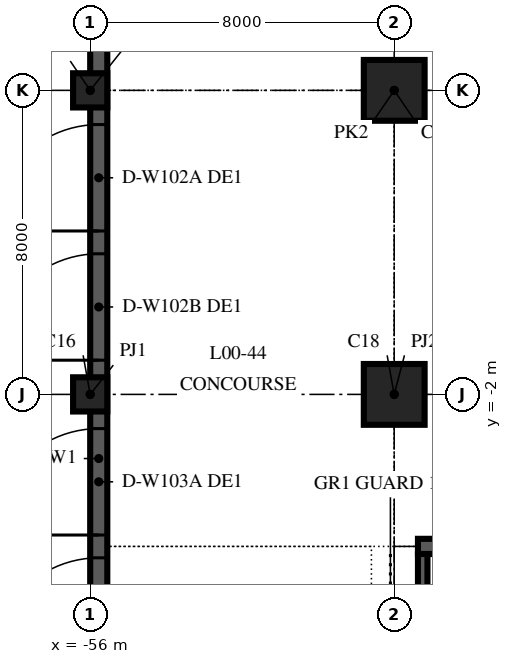
"""IFC4 building model, lengths in metres.
Left out: names, types, materials, properties, quantities, classifications, styles, units other than length and angle.
Written with IfcOpenShell. Run it as: python <this file> out.ifc"""

import sys

from ifc_helpers import new_model, si_unit, direction, frame, frame_2d, origin, origin_2d, place, context, subcontext, project, spatial, rectangle, extrude, element, fill, save


model = new_model("IFC4")
c1 = context("Model", 3, precision=1e-05, world=origin(), true_north=direction((0.0, 1.0)))
c2 = subcontext(c1, "Body", "Model", "MODEL_VIEW")
j1 = project(units=[si_unit("LENGTHUNIT", "METRE"), si_unit("PLANEANGLEUNIT", "RADIAN")], contexts=[c1])
p1 = place(None, origin())
s1 = spatial("IfcSite", under=j1, at=p1, CompositionType="ELEMENT")
p2 = place(p1, origin())
s2 = spatial("IfcBuilding", under=s1, at=p2, CompositionType="ELEMENT")
p3 = place(p2, origin())
s3 = spatial("IfcBuildingStorey", under=s2, at=p3, CompositionType="ELEMENT", Elevation=0.0)
for number, where, z_axis, x_axis in (
    (1, (-56.0, -2.0, 0.0), (0.0, 0.0, 1.0), (1.0, 0.0, 0.0)),
    (2, (-56.0, 6.0, 0.0), (0.0, 0.0, 1.0), (1.0, 0.0, 0.0)),
):
    element("IfcColumn", number, at=place(p3, frame(where, z_axis=z_axis, x_axis=x_axis)), inside=s3, PredefinedType="COLUMN", context=c2, shape_type="SweptSolid", body=[
        extrude(rectangle(XDim=0.9, YDim=0.9, at=origin_2d()), origin(), (0.0, 0.0, 1.0), 6.0),
    ])
for number, where, z_axis, x_axis in (
    (3, (-48.0, -2.0, 0.0), (0.0, 0.0, 1.0), (1.0, 0.0, 0.0)),
    (4, (-48.0, 6.0, 0.0), (0.0, 0.0, 1.0), (1.0, 0.0, 0.0)),
):
    element("IfcColumn", number, at=place(p3, frame(where, z_axis=z_axis, x_axis=x_axis)), inside=s3, PredefinedType="COLUMN", context=c2, shape_type="SweptSolid", body=[
        extrude(rectangle(XDim=1.6, YDim=1.6, at=origin_2d()), origin(), (0.0, 0.0, 1.0), 6.0),
    ])
p4 = place(p3, frame((-47.375, -6.0, 0.0), z_axis=(0.0, 0.0, 1.0), x_axis=(1.0, 0.0, 0.0)))
e5 = element("IfcWall", 5, at=p4, inside=s3, PredefinedType="SHEAR", context=c2, shape_type="SweptSolid", body=[
    extrude(rectangle(XDim=16.125, YDim=0.4, at=frame_2d((8.062, 0.0))), origin(), (0.0, 0.0, 1.0), 6.0),
])
p5 = place(p4, frame((12.775, 0.0, 0.0)))
e6 = element("IfcOpeningElement", 6, at=p5, cuts=e5, PredefinedType="OPENING", context=c2, shape_type="SweptSolid", body=[
    extrude(rectangle(XDim=1.8, YDim=2.1, at=frame_2d((0.9, 1.05))), frame((0.0, 0.215, 0.0), z_axis=(0.0, -1.0, 0.0), x_axis=(1.0, 0.0, 0.0)), (0.0, 0.0, 1.0), 0.43),
])
p6 = place(p4, frame((3.075, 0.0, 0.0)))
e7 = element("IfcOpeningElement", 7, at=p6, cuts=e5, PredefinedType="OPENING", context=c2, shape_type="SweptSolid", body=[
    extrude(rectangle(XDim=1.8, YDim=2.1, at=frame_2d((0.9, 1.05))), frame((0.0, 0.215, 0.0), z_axis=(0.0, -1.0, 0.0), x_axis=(1.0, 0.0, 0.0)), (0.0, 0.0, 1.0), 0.43),
])
p7 = place(p3, frame((-55.775, 8.0, 0.0), z_axis=(0.0, 0.0, 1.0), x_axis=(0.0, -1.0, 0.0)))
e8 = element("IfcWall", 8, at=p7, inside=s3, PredefinedType="SOLIDWALL", context=c2, shape_type="SweptSolid", body=[
    extrude(rectangle(XDim=81.55, YDim=0.45, at=frame_2d((40.775, 0.0))), origin(), (0.0, 0.0, 1.0), 6.0),
])
p8 = place(p7, frame((2.9, 0.0, 0.0)))
e9 = element("IfcOpeningElement", 9, at=p8, cuts=e8, PredefinedType="OPENING", context=c2, shape_type="SweptSolid", body=[
    extrude(rectangle(XDim=2.8, YDim=2.4, at=frame_2d((1.4, 1.2))), frame((0.0, 0.24, 0.0), z_axis=(0.0, -1.0, 0.0), x_axis=(1.0, 0.0, 0.0)), (0.0, 0.0, 1.0), 0.48),
])
p9 = place(p7, frame((6.3, 0.0, 0.0)))
e10 = element("IfcOpeningElement", 10, at=p9, cuts=e8, PredefinedType="OPENING", context=c2, shape_type="SweptSolid", body=[
    extrude(rectangle(XDim=2.8, YDim=2.4, at=frame_2d((1.4, 1.2))), frame((0.0, 0.24, 0.0), z_axis=(0.0, -1.0, 0.0), x_axis=(1.0, 0.0, 0.0)), (0.0, 0.0, 1.0), 0.48),
])
p10 = place(p7, frame((10.9, 0.0, 0.0)))
e11 = element("IfcOpeningElement", 11, at=p10, cuts=e8, PredefinedType="OPENING", context=c2, shape_type="SweptSolid", body=[
    extrude(rectangle(XDim=2.8, YDim=2.4, at=frame_2d((1.4, 1.2))), frame((0.0, 0.24, 0.0), z_axis=(0.0, -1.0, 0.0), x_axis=(1.0, 0.0, 0.0)), (0.0, 0.0, 1.0), 0.48),
])
p11 = place(p7, frame((14.3, 0.0, 0.0)))
e12 = element("IfcOpeningElement", 12, at=p11, cuts=e8, PredefinedType="OPENING", context=c2, shape_type="SweptSolid", body=[
    extrude(rectangle(XDim=2.8, YDim=2.4, at=frame_2d((1.4, 1.2))), frame((0.0, 0.24, 0.0), z_axis=(0.0, -1.0, 0.0), x_axis=(1.0, 0.0, 0.0)), (0.0, 0.0, 1.0), 0.48),
])
p12 = place(p7, frame((18.9, 0.0, 0.0)))
e13 = element("IfcOpeningElement", 13, at=p12, cuts=e8, PredefinedType="OPENING", context=c2, shape_type="SweptSolid", body=[
    extrude(rectangle(XDim=2.8, YDim=2.4, at=frame_2d((1.4, 1.2))), frame((0.0, 0.24, 0.0), z_axis=(0.0, -1.0, 0.0), x_axis=(1.0, 0.0, 0.0)), (0.0, 0.0, 1.0), 0.48),
])
p13 = place(p7, frame((22.3, 0.0, 0.0)))
e14 = element("IfcOpeningElement", 14, at=p13, cuts=e8, PredefinedType="OPENING", context=c2, shape_type="SweptSolid", body=[
    extrude(rectangle(XDim=2.8, YDim=2.4, at=frame_2d((1.4, 1.2))), frame((0.0, 0.24, 0.0), z_axis=(0.0, -1.0, 0.0), x_axis=(1.0, 0.0, 0.0)), (0.0, 0.0, 1.0), 0.48),
])
p14 = place(p7, frame((26.9, 0.0, 0.0)))
e15 = element("IfcOpeningElement", 15, at=p14, cuts=e8, PredefinedType="OPENING", context=c2, shape_type="SweptSolid", body=[
    extrude(rectangle(XDim=2.8, YDim=2.4, at=frame_2d((1.4, 1.2))), frame((0.0, 0.24, 0.0), z_axis=(0.0, -1.0, 0.0), x_axis=(1.0, 0.0, 0.0)), (0.0, 0.0, 1.0), 0.48),
])
p15 = place(p7, frame((30.3, 0.0, 0.0)))
e16 = element("IfcOpeningElement", 16, at=p15, cuts=e8, PredefinedType="OPENING", context=c2, shape_type="SweptSolid", body=[
    extrude(rectangle(XDim=2.8, YDim=2.4, at=frame_2d((1.4, 1.2))), frame((0.0, 0.24, 0.0), z_axis=(0.0, -1.0, 0.0), x_axis=(1.0, 0.0, 0.0)), (0.0, 0.0, 1.0), 0.48),
])
p16 = place(p7, frame((35.325, 0.0, 0.0)))
e17 = element("IfcOpeningElement", 17, at=p16, cuts=e8, PredefinedType="OPENING", context=c2, shape_type="SweptSolid", body=[
    extrude(rectangle(XDim=2.8, YDim=2.4, at=frame_2d((1.4, 1.2))), frame((0.0, 0.24, 0.0), z_axis=(0.0, -1.0, 0.0), x_axis=(1.0, 0.0, 0.0)), (0.0, 0.0, 1.0), 0.48),
])
p17 = place(p7, frame((42.9, 0.0, 0.0)))
e18 = element("IfcOpeningElement", 18, at=p17, cuts=e8, PredefinedType="OPENING", context=c2, shape_type="SweptSolid", body=[
    extrude(rectangle(XDim=2.8, YDim=2.4, at=frame_2d((1.4, 1.2))), frame((0.0, 0.24, 0.0), z_axis=(0.0, -1.0, 0.0), x_axis=(1.0, 0.0, 0.0)), (0.0, 0.0, 1.0), 0.48),
])
p18 = place(p7, frame((46.3, 0.0, 0.0)))
e19 = element("IfcOpeningElement", 19, at=p18, cuts=e8, PredefinedType="OPENING", context=c2, shape_type="SweptSolid", body=[
    extrude(rectangle(XDim=2.8, YDim=2.4, at=frame_2d((1.4, 1.2))), frame((0.0, 0.24, 0.0), z_axis=(0.0, -1.0, 0.0), x_axis=(1.0, 0.0, 0.0)), (0.0, 0.0, 1.0), 0.48),
])
p19 = place(p7, frame((50.9, 0.0, 0.0)))
e20 = element("IfcOpeningElement", 20, at=p19, cuts=e8, PredefinedType="OPENING", context=c2, shape_type="SweptSolid", body=[
    extrude(rectangle(XDim=2.8, YDim=2.4, at=frame_2d((1.4, 1.2))), frame((0.0, 0.24, 0.0), z_axis=(0.0, -1.0, 0.0), x_axis=(1.0, 0.0, 0.0)), (0.0, 0.0, 1.0), 0.48),
])
p20 = place(p7, frame((54.3, 0.0, 0.0)))
e21 = element("IfcOpeningElement", 21, at=p20, cuts=e8, PredefinedType="OPENING", context=c2, shape_type="SweptSolid", body=[
    extrude(rectangle(XDim=2.8, YDim=2.4, at=frame_2d((1.4, 1.2))), frame((0.0, 0.24, 0.0), z_axis=(0.0, -1.0, 0.0), x_axis=(1.0, 0.0, 0.0)), (0.0, 0.0, 1.0), 0.48),
])
p21 = place(p7, frame((58.9, 0.0, 0.0)))
e22 = element("IfcOpeningElement", 22, at=p21, cuts=e8, PredefinedType="OPENING", context=c2, shape_type="SweptSolid", body=[
    extrude(rectangle(XDim=2.8, YDim=2.4, at=frame_2d((1.4, 1.2))), frame((0.0, 0.24, 0.0), z_axis=(0.0, -1.0, 0.0), x_axis=(1.0, 0.0, 0.0)), (0.0, 0.0, 1.0), 0.48),
])
p22 = place(p7, frame((62.3, 0.0, 0.0)))
e23 = element("IfcOpeningElement", 23, at=p22, cuts=e8, PredefinedType="OPENING", context=c2, shape_type="SweptSolid", body=[
    extrude(rectangle(XDim=2.8, YDim=2.4, at=frame_2d((1.4, 1.2))), frame((0.0, 0.24, 0.0), z_axis=(0.0, -1.0, 0.0), x_axis=(1.0, 0.0, 0.0)), (0.0, 0.0, 1.0), 0.48),
])
p23 = place(p7, frame((66.9, 0.0, 0.0)))
e24 = element("IfcOpeningElement", 24, at=p23, cuts=e8, PredefinedType="OPENING", context=c2, shape_type="SweptSolid", body=[
    extrude(rectangle(XDim=2.8, YDim=2.4, at=frame_2d((1.4, 1.2))), frame((0.0, 0.24, 0.0), z_axis=(0.0, -1.0, 0.0), x_axis=(1.0, 0.0, 0.0)), (0.0, 0.0, 1.0), 0.48),
])
p24 = place(p7, frame((70.3, 0.0, 0.0)))
e25 = element("IfcOpeningElement", 25, at=p24, cuts=e8, PredefinedType="OPENING", context=c2, shape_type="SweptSolid", body=[
    extrude(rectangle(XDim=2.8, YDim=2.4, at=frame_2d((1.4, 1.2))), frame((0.0, 0.24, 0.0), z_axis=(0.0, -1.0, 0.0), x_axis=(1.0, 0.0, 0.0)), (0.0, 0.0, 1.0), 0.48),
])
p25 = place(p7, frame((74.675, 0.0, 0.0)))
e26 = element("IfcOpeningElement", 26, at=p25, cuts=e8, PredefinedType="OPENING", context=c2, shape_type="SweptSolid", body=[
    extrude(rectangle(XDim=2.8, YDim=2.4, at=frame_2d((1.4, 1.2))), frame((0.0, 0.24, 0.0), z_axis=(0.0, -1.0, 0.0), x_axis=(1.0, 0.0, 0.0)), (0.0, 0.0, 1.0), 0.48),
])
p26 = place(p7, frame((78.075, 0.0, 0.0)))
e27 = element("IfcOpeningElement", 27, at=p26, cuts=e8, PredefinedType="OPENING", context=c2, shape_type="SweptSolid", body=[
    extrude(rectangle(XDim=2.8, YDim=2.4, at=frame_2d((1.4, 1.2))), frame((0.0, 0.24, 0.0), z_axis=(0.0, -1.0, 0.0), x_axis=(1.0, 0.0, 0.0)), (0.0, 0.0, 1.0), 0.48),
])
p27 = place(p3, frame((-47.25, -16.075, 0.0), z_axis=(0.0, 0.0, 1.0), x_axis=(0.0, 1.0, 0.0)))
e28 = element("IfcWall", 28, at=p27, inside=s3, PredefinedType="SOLIDWALL", context=c2, shape_type="SweptSolid", body=[
    extrude(rectangle(XDim=9.875, YDim=0.25, at=frame_2d((4.938, 0.0))), origin(), (0.0, 0.0, 1.0), 2.75),
])
p28 = place(p8, frame((2.8, 0.0, 0.0), z_axis=(0.0, 0.0, 1.0), x_axis=(-1.0, 0.0, 0.0)))
e29 = element("IfcDoor", 29, at=p28, inside=s3, OperationType="DOUBLE_DOOR_SINGLE_SWING", PredefinedType="DOOR", context=c2, shape_type="SweptSolid", body=[
    extrude(rectangle(XDim=2.8, YDim=2.4, at=frame_2d((1.4, 1.2))), frame((0.0, 0.225, 0.0), z_axis=(0.0, -1.0, 0.0), x_axis=(1.0, 0.0, 0.0)), (0.0, 0.0, 1.0), 0.449),
])
fill(e9, e29)
p29 = place(p9, frame((2.8, 0.0, 0.0), z_axis=(0.0, 0.0, 1.0), x_axis=(-1.0, 0.0, 0.0)))
e30 = element("IfcDoor", 30, at=p29, inside=s3, OperationType="DOUBLE_DOOR_SINGLE_SWING", PredefinedType="DOOR", context=c2, shape_type="SweptSolid", body=[
    extrude(rectangle(XDim=2.8, YDim=2.4, at=frame_2d((1.4, 1.2))), frame((0.0, 0.225, 0.0), z_axis=(0.0, -1.0, 0.0), x_axis=(1.0, 0.0, 0.0)), (0.0, 0.0, 1.0), 0.449),
])
fill(e10, e30)
p30 = place(p10, frame((2.8, 0.0, 0.0), z_axis=(0.0, 0.0, 1.0), x_axis=(-1.0, 0.0, 0.0)))
e31 = element("IfcDoor", 31, at=p30, inside=s3, OperationType="DOUBLE_DOOR_SINGLE_SWING", PredefinedType="DOOR", context=c2, shape_type="SweptSolid", body=[
    extrude(rectangle(XDim=2.8, YDim=2.4, at=frame_2d((1.4, 1.2))), frame((0.0, 0.225, 0.0), z_axis=(0.0, -1.0, 0.0), x_axis=(1.0, 0.0, 0.0)), (0.0, 0.0, 1.0), 0.449),
])
fill(e11, e31)
p31 = place(p11, frame((2.8, 0.0, 0.0), z_axis=(0.0, 0.0, 1.0), x_axis=(-1.0, 0.0, 0.0)))
e32 = element("IfcDoor", 32, at=p31, inside=s3, OperationType="DOUBLE_DOOR_SINGLE_SWING", PredefinedType="DOOR", context=c2, shape_type="SweptSolid", body=[
    extrude(rectangle(XDim=2.8, YDim=2.4, at=frame_2d((1.4, 1.2))), frame((0.0, 0.225, 0.0), z_axis=(0.0, -1.0, 0.0), x_axis=(1.0, 0.0, 0.0)), (0.0, 0.0, 1.0), 0.449),
])
fill(e12, e32)
save(model, sys.argv[1])
